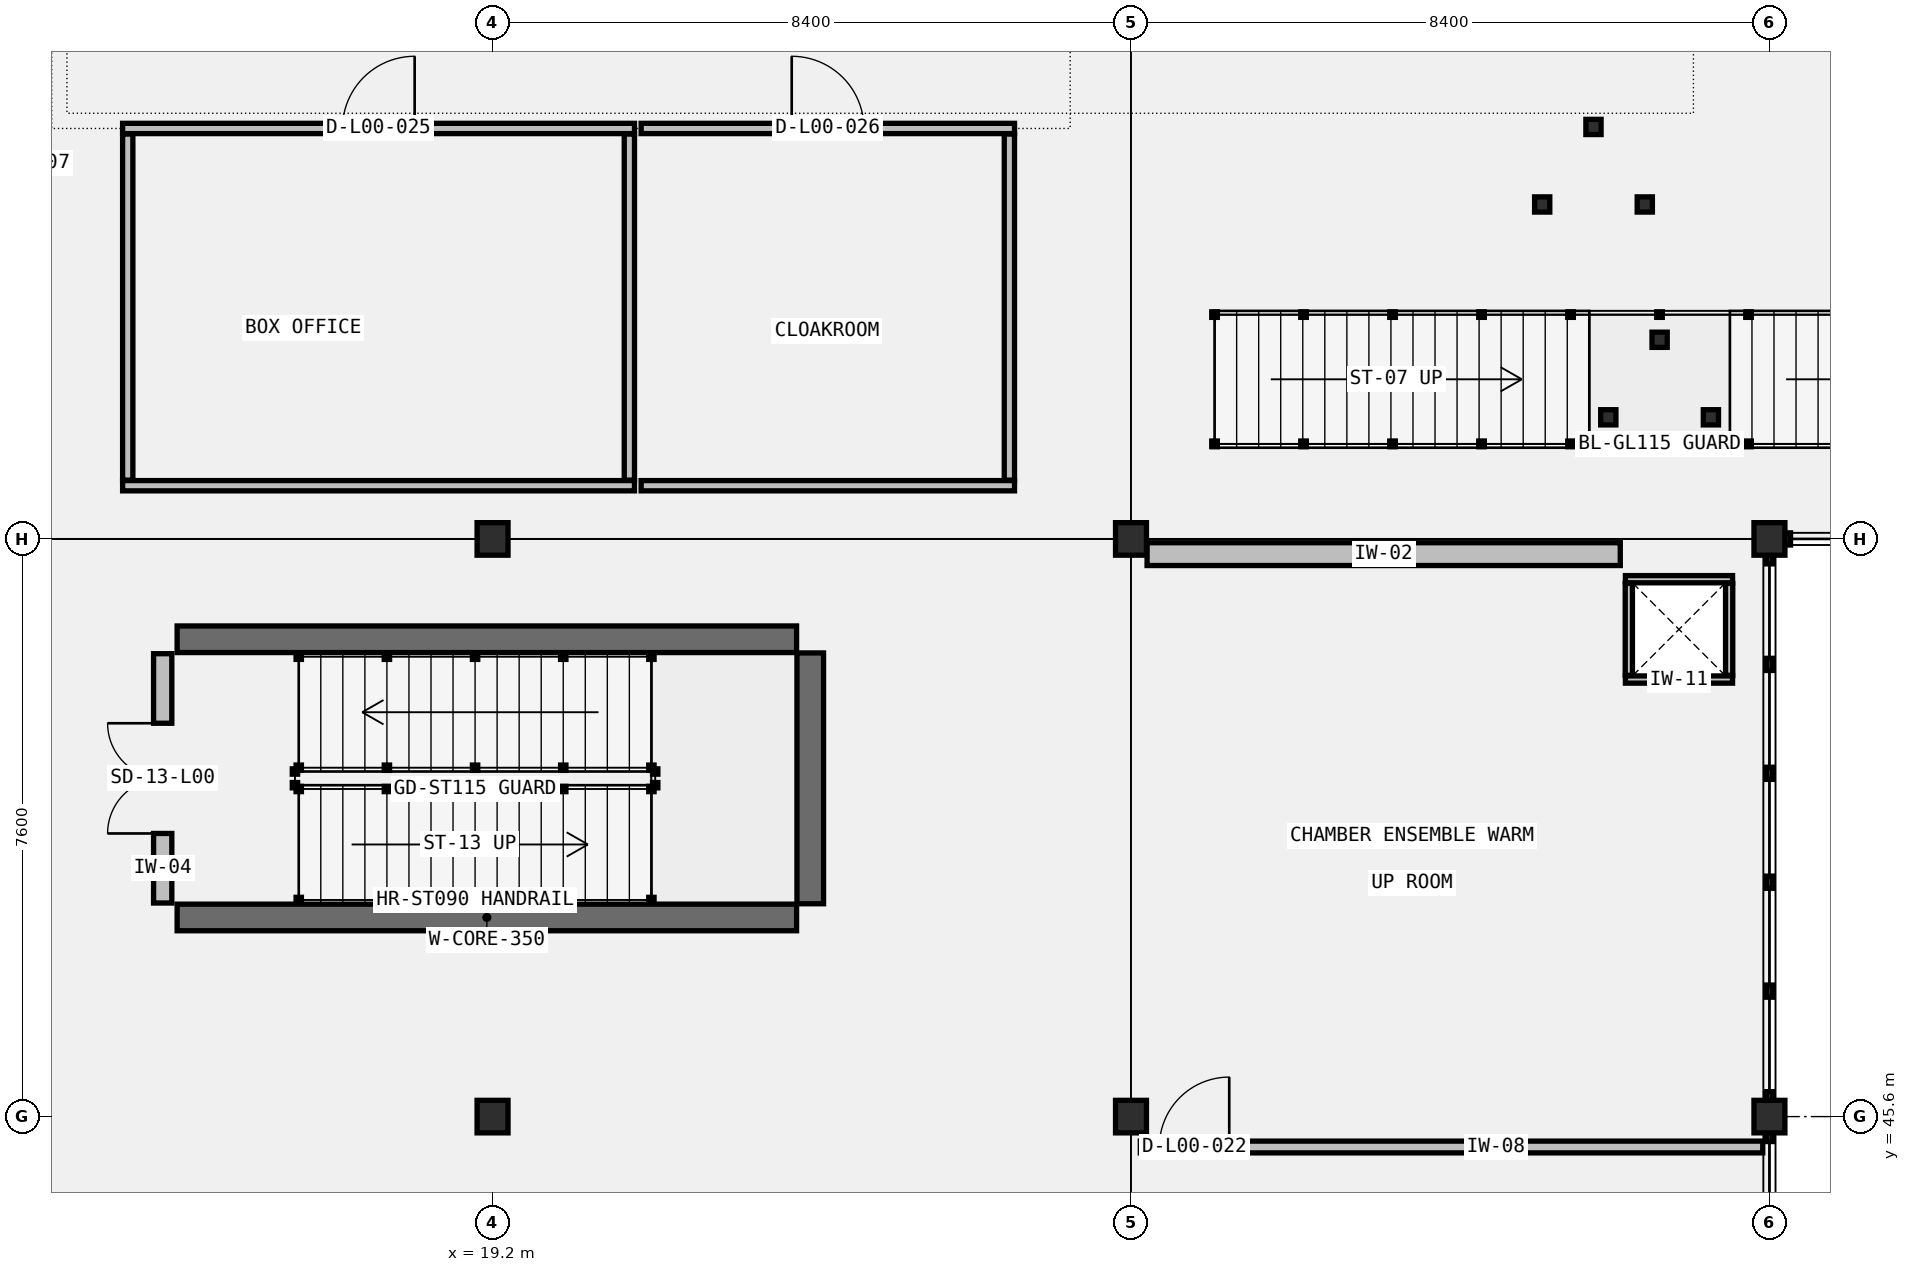
"""IFC4 building model, lengths in metres.
Left out: names, types, materials, properties, quantities, classifications, styles, units other than length and angle.
Written with IfcOpenShell. Run it as: python <this file> out.ifc"""

import sys

from ifc_helpers import new_model, si_unit, direction, frame, frame_2d, origin, origin_2d, place, context, subcontext, project, spatial, rectangle, i_section, extrude, element, fill, save


model = new_model("IFC4")
c1 = context("Model", 3, precision=1e-05, world=origin(), true_north=direction((0.0, 1.0)))
c2 = subcontext(c1, "Body", "Model", "MODEL_VIEW")
j1 = project(units=[si_unit("LENGTHUNIT", "METRE"), si_unit("PLANEANGLEUNIT", "RADIAN")], contexts=[c1])
p1 = place(None, origin())
s1 = spatial("IfcSite", under=j1, at=p1, CompositionType="ELEMENT")
p2 = place(p1, origin())
s2 = spatial("IfcBuilding", under=s1, at=p2, CompositionType="ELEMENT")
p3 = place(p2, origin())
s3 = spatial("IfcBuildingStorey", under=s2, at=p3, CompositionType="ELEMENT", Elevation=0.0)
for number, where, z_axis, x_axis in (
    (1, (19.2, 45.6, -0.3), (0.0, 0.0, 1.0), (1.0, 0.0, 0.0)),
    (2, (19.2, 53.2, -0.3), (0.0, 0.0, 1.0), (1.0, 0.0, 0.0)),
    (3, (27.6, 45.6, -0.3), (0.0, 0.0, 1.0), (1.0, 0.0, 0.0)),
    (4, (27.6, 53.2, -0.3), (0.0, 0.0, 1.0), (1.0, 0.0, 0.0)),
    (5, (36.0, 45.6, -0.3), (0.0, 0.0, 1.0), (1.0, 0.0, 0.0)),
    (6, (36.0, 53.2, -0.3), (0.0, 0.0, 1.0), (1.0, 0.0, 0.0)),
):
    element("IfcColumn", number, at=place(p3, frame(where, z_axis=z_axis, x_axis=x_axis)), inside=s3, PredefinedType="COLUMN", context=c2, shape_type="SweptSolid", body=[
        extrude(i_section(OverallWidth=0.407, OverallDepth=0.428, WebThickness=0.02, FlangeThickness=0.035, FilletRadius=0.022, at=origin_2d()), origin(), (0.0, 0.0, 1.0), 5.7),
    ])
p4 = place(p3, frame((15.05, 48.22, -0.3), z_axis=(0.0, 0.0, 1.0), x_axis=(1.0, 0.0, 0.0)))
e7 = element("IfcWall", 7, at=p4, inside=s3, PredefinedType="SHEAR", context=c2, shape_type="SweptSolid", body=[
    extrude(rectangle(XDim=8.15, YDim=0.35, at=frame_2d((4.075, 0.0))), origin(), (0.0, 0.0, 1.0), 5.46),
])
p5 = place(p3, frame((23.38, 48.4, -0.3), z_axis=(0.0, 0.0, 1.0), x_axis=(0.0, 1.0, 0.0)))
e8 = element("IfcWall", 8, at=p5, inside=s3, PredefinedType="SHEAR", context=c2, shape_type="SweptSolid", body=[
    extrude(rectangle(XDim=3.3, YDim=0.35, at=frame_2d((1.65, 0.0))), origin(), (0.0, 0.0, 1.0), 5.46),
])
p6 = place(p3, frame((23.2, 51.88, -0.3), z_axis=(0.0, 0.0, 1.0), x_axis=(-1.0, 0.0, 0.0)))
e9 = element("IfcWall", 9, at=p6, inside=s3, PredefinedType="SHEAR", context=c2, shape_type="SweptSolid", body=[
    extrude(rectangle(XDim=8.15, YDim=0.35, at=frame_2d((4.075, 0.0))), origin(), (0.0, 0.0, 1.0), 5.46),
])
for number, where, z_axis, x_axis in (
    (10, (34.105, 51.35, 0.0), (0.0, 0.0, 1.0), (1.0, 0.0, 0.0)),
    (11, (34.105, 52.67, 0.0), (0.0, 0.0, 1.0), (1.0, 0.0, 0.0)),
):
    element("IfcWall", number, at=place(p3, frame(where, z_axis=z_axis, x_axis=x_axis)), inside=s3, PredefinedType="PARTITIONING", context=c2, shape_type="SweptSolid", body=[
        extrude(rectangle(XDim=1.41, YDim=0.095, at=frame_2d((0.705, 0.0))), origin(), (0.0, 0.0, 1.0), 5.16),
    ])
for number, where, z_axis, x_axis in (
    (12, (34.15, 51.405, 0.0), (0.0, 0.0, 1.0), (0.0, 1.0, 0.0)),
    (13, (35.47, 51.405, 0.0), (0.0, 0.0, 1.0), (0.0, 1.0, 0.0)),
):
    element("IfcWall", number, at=place(p3, frame(where, z_axis=z_axis, x_axis=x_axis)), inside=s3, PredefinedType="PARTITIONING", context=c2, shape_type="SweptSolid", body=[
        extrude(rectangle(XDim=1.21, YDim=0.095, at=frame_2d((0.605, 0.0))), origin(), (0.0, 0.0, 1.0), 5.16),
    ])
p7 = place(p3, frame((14.86, 48.41, 0.0), z_axis=(0.0, 0.0, 1.0), x_axis=(0.0, 1.0, 0.0)))
e14 = element("IfcWall", 14, at=p7, inside=s3, PredefinedType="STANDARD", context=c2, shape_type="SweptSolid", body=[
    extrude(rectangle(XDim=3.28, YDim=0.24, at=frame_2d((1.64, 0.0))), origin(), (0.0, 0.0, 1.0), 4.788),
])
p8 = place(p7, frame((0.915, 0.0, 0.0)))
e15 = element("IfcOpeningElement", 15, at=p8, cuts=e14, PredefinedType="OPENING", context=c2, shape_type="SweptSolid", body=[
    extrude(rectangle(XDim=1.45, YDim=2.2, at=frame_2d((0.725, 1.1))), frame((0.0, 0.13, 0.0), z_axis=(0.0, -1.0, 0.0), x_axis=(1.0, 0.0, 0.0)), (0.0, 0.0, 1.0), 0.26),
])
for number, where, z_axis, x_axis in (
    (16, (33.88, 54.8, -0.3), (0.0, 0.0, 1.0), (1.0, 0.0, 0.0)),
    (17, (35.23, 54.8, -0.3), (0.0, 0.0, 1.0), (1.0, 0.0, 0.0)),
    (18, (34.555, 55.82, -0.3), (0.0, 0.0, 1.0), (1.0, 0.0, 0.0)),
):
    element("IfcColumn", number, at=place(p3, frame(where, z_axis=z_axis, x_axis=x_axis)), inside=s3, PredefinedType="COLUMN", context=c2, shape_type="SweptSolid", body=[
        extrude(i_section(OverallWidth=0.2, OverallDepth=0.2, WebThickness=0.008, FlangeThickness=0.012, FilletRadius=0.013, at=origin_2d()), origin(), (0.0, 0.0, 1.0), 2.83),
    ])
for number, where, z_axis, x_axis in (
    (19, (33.01, 57.6, -0.3), (0.0, 0.0, 1.0), (1.0, 0.0, 0.0)),
    (20, (34.36, 57.6, -0.3), (0.0, 0.0, 1.0), (1.0, 0.0, 0.0)),
    (21, (33.685, 58.62, -0.3), (0.0, 0.0, 1.0), (1.0, 0.0, 0.0)),
):
    element("IfcColumn", number, at=place(p3, frame(where, z_axis=z_axis, x_axis=x_axis)), inside=s3, PredefinedType="COLUMN", context=c2, shape_type="SweptSolid", body=[
        extrude(i_section(OverallWidth=0.2, OverallDepth=0.2, WebThickness=0.008, FlangeThickness=0.012, FilletRadius=0.013, at=origin_2d()), origin(), (0.0, 0.0, 1.0), 5.7),
    ])
p9 = place(p3, frame((27.722, 45.2, 0.0), z_axis=(0.0, 0.0, 1.0), x_axis=(1.0, 0.0, 0.0)))
e22 = element("IfcWall", 22, at=p9, inside=s3, PredefinedType="PARTITIONING", context=c2, shape_type="SweptSolid", body=[
    extrude(rectangle(XDim=8.19, YDim=0.155, at=frame_2d((4.095, 0.0))), origin(), (0.0, 0.0, 1.0), 4.748),
])
p10 = place(p9, frame((0.25, 0.0, 0.0)))
e23 = element("IfcOpeningElement", 23, at=p10, cuts=e22, PredefinedType="OPENING", context=c2, shape_type="SweptSolid", body=[
    extrude(rectangle(XDim=0.92, YDim=2.12, at=frame_2d((0.46, 1.06))), frame((0.0, 0.087, 0.0), z_axis=(0.0, -1.0, 0.0), x_axis=(1.0, 0.0, 0.0)), (0.0, 0.0, 1.0), 0.175),
])
p11 = place(p3, frame((27.812, 53.0, 0.0), z_axis=(0.0, 0.0, 1.0), x_axis=(1.0, 0.0, 0.0)))
e24 = element("IfcWall", 24, at=p11, inside=s3, PredefinedType="PARTITIONING", context=c2, shape_type="SweptSolid", body=[
    extrude(rectangle(XDim=6.226, YDim=0.3, at=frame_2d((3.113, 0.0))), origin(), (0.0, 0.0, 1.0), 4.65),
])
p12 = place(p3, frame((14.333, 58.6, 0.0), z_axis=(0.0, 0.0, 1.0), x_axis=(1.0, 0.0, 0.0)))
e25 = element("IfcWall", 25, at=p12, inside=s3, PredefinedType="PARTITIONING", context=c2, shape_type="SweptSolid", body=[
    extrude(rectangle(XDim=6.735, YDim=0.135, at=frame_2d((3.367, 0.0))), origin(), (0.0, 0.0, 1.0), 4.738),
])
p13 = place(p12, frame((2.893, 0.0, 0.0)))
e26 = element("IfcOpeningElement", 26, at=p13, cuts=e25, PredefinedType="OPENING", context=c2, shape_type="SweptSolid", body=[
    extrude(rectangle(XDim=0.95, YDim=2.12, at=frame_2d((0.475, 1.06))), frame((0.0, 0.077, 0.0), z_axis=(0.0, -1.0, 0.0), x_axis=(1.0, 0.0, 0.0)), (0.0, 0.0, 1.0), 0.155),
])
p14 = place(p3, frame((14.333, 53.9, 0.0), z_axis=(0.0, 0.0, 1.0), x_axis=(1.0, 0.0, 0.0)))
e27 = element("IfcWall", 27, at=p14, inside=s3, PredefinedType="PARTITIONING", context=c2, shape_type="SweptSolid", body=[
    extrude(rectangle(XDim=6.735, YDim=0.135, at=frame_2d((3.367, 0.0))), origin(), (0.0, 0.0, 1.0), 4.738),
])
for number, where, z_axis, x_axis in (
    (28, (14.4, 53.973, 0.0), (0.0, 0.0, 1.0), (0.0, 1.0, 0.0)),
    (29, (21.0, 53.973, 0.0), (0.0, 0.0, 1.0), (0.0, 1.0, 0.0)),
):
    element("IfcWall", number, at=place(p3, frame(where, z_axis=z_axis, x_axis=x_axis)), inside=s3, PredefinedType="PARTITIONING", context=c2, shape_type="SweptSolid", body=[
        extrude(rectangle(XDim=4.553, YDim=0.135, at=frame_2d((2.277, 0.0))), origin(), (0.0, 0.0, 1.0), 5.16),
    ])
p15 = place(p3, frame((21.155, 58.6, 0.0), z_axis=(0.0, 0.0, 1.0), x_axis=(1.0, 0.0, 0.0)))
e30 = element("IfcWall", 30, at=p15, inside=s3, PredefinedType="PARTITIONING", context=c2, shape_type="SweptSolid", body=[
    extrude(rectangle(XDim=4.912, YDim=0.135, at=frame_2d((2.456, 0.0))), origin(), (0.0, 0.0, 1.0), 4.738),
])
p16 = place(p15, frame((1.981, 0.0, 0.0)))
e31 = element("IfcOpeningElement", 31, at=p16, cuts=e30, PredefinedType="OPENING", context=c2, shape_type="SweptSolid", body=[
    extrude(rectangle(XDim=0.95, YDim=2.12, at=frame_2d((0.475, 1.06))), frame((0.0, 0.077, 0.0), z_axis=(0.0, -1.0, 0.0), x_axis=(1.0, 0.0, 0.0)), (0.0, 0.0, 1.0), 0.155),
])
p17 = place(p3, frame((21.155, 53.9, 0.0), z_axis=(0.0, 0.0, 1.0), x_axis=(1.0, 0.0, 0.0)))
e32 = element("IfcWall", 32, at=p17, inside=s3, PredefinedType="PARTITIONING", context=c2, shape_type="SweptSolid", body=[
    extrude(rectangle(XDim=4.912, YDim=0.135, at=frame_2d((2.456, 0.0))), origin(), (0.0, 0.0, 1.0), 4.738),
])
p18 = place(p3, frame((26.0, 53.973, 0.0), z_axis=(0.0, 0.0, 1.0), x_axis=(0.0, 1.0, 0.0)))
e33 = element("IfcWall", 33, at=p18, inside=s3, PredefinedType="PARTITIONING", context=c2, shape_type="SweptSolid", body=[
    extrude(rectangle(XDim=4.553, YDim=0.135, at=frame_2d((2.277, 0.0))), origin(), (0.0, 0.0, 1.0), 5.16),
])
p19 = place(p8, origin())
e34 = element("IfcDoor", 34, at=p19, inside=s3, OperationType="DOUBLE_DOOR_SINGLE_SWING", PredefinedType="DOOR", context=c2, shape_type="SweptSolid", body=[
    extrude(rectangle(XDim=1.45, YDim=2.2, at=frame_2d((0.725, 1.1))), frame((0.0, 0.025, 0.0), z_axis=(0.0, -1.0, 0.0), x_axis=(1.0, 0.0, 0.0)), (0.0, 0.0, 1.0), 0.05),
])
fill(e15, e34)
p20 = place(p10, origin())
e35 = element("IfcDoor", 35, at=p20, inside=s3, OperationType="SINGLE_SWING_RIGHT", PredefinedType="DOOR", context=c2, shape_type="SweptSolid", body=[
    extrude(rectangle(XDim=0.92, YDim=2.12, at=frame_2d((0.46, 1.06))), frame((0.0, 0.025, 0.0), z_axis=(0.0, -1.0, 0.0), x_axis=(1.0, 0.0, 0.0)), (0.0, 0.0, 1.0), 0.05),
])
fill(e23, e35)
p21 = place(p13, origin())
e36 = element("IfcDoor", 36, at=p21, inside=s3, OperationType="SINGLE_SWING_RIGHT", PredefinedType="DOOR", context=c2, shape_type="SweptSolid", body=[
    extrude(rectangle(XDim=0.95, YDim=2.12, at=frame_2d((0.475, 1.06))), frame((0.0, 0.025, 0.0), z_axis=(0.0, -1.0, 0.0), x_axis=(1.0, 0.0, 0.0)), (0.0, 0.0, 1.0), 0.05),
])
fill(e26, e36)
p22 = place(p16, origin())
e37 = element("IfcDoor", 37, at=p22, inside=s3, OperationType="SINGLE_SWING_LEFT", PredefinedType="DOOR", context=c2, shape_type="SweptSolid", body=[
    extrude(rectangle(XDim=0.95, YDim=2.12, at=frame_2d((0.475, 1.06))), frame((0.0, 0.025, 0.0), z_axis=(0.0, -1.0, 0.0), x_axis=(1.0, 0.0, 0.0)), (0.0, 0.0, 1.0), 0.05),
])
fill(e31, e37)
save(model, sys.argv[1])
